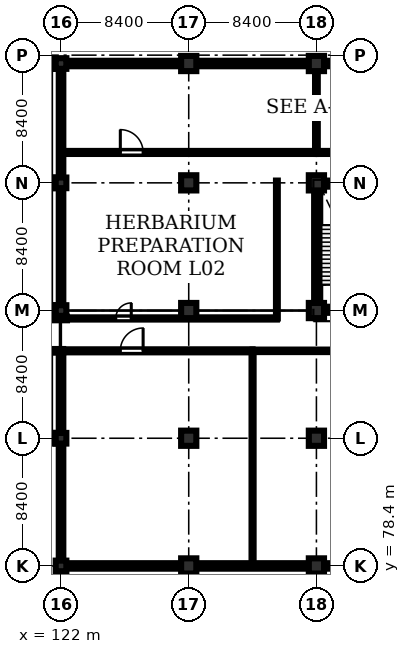
"""IFC4 building model, lengths in metres.
Left out: names, types, materials, properties, quantities, classifications, styles, units other than length and angle.
Written with IfcOpenShell. Run it as: python <this file> out.ifc"""

import sys

from ifc_helpers import new_model, si_unit, direction, frame, frame_2d, origin, origin_2d, place, context, subcontext, project, spatial, rectangle, extrude, element, fill, save


model = new_model("IFC4")
c1 = context("Model", 3, precision=1e-05, world=origin(), true_north=direction((0.0, 1.0)))
c2 = subcontext(c1, "Body", "Model", "MODEL_VIEW")
j1 = project(units=[si_unit("LENGTHUNIT", "METRE"), si_unit("PLANEANGLEUNIT", "RADIAN")], contexts=[c1])
p1 = place(None, origin())
s1 = spatial("IfcSite", under=j1, at=p1, CompositionType="ELEMENT")
p2 = place(p1, origin())
s2 = spatial("IfcBuilding", under=s1, at=p2, CompositionType="ELEMENT")
p3 = place(p2, frame((0.0, 0.0, 5.4)))
s3 = spatial("IfcBuildingStorey", under=s2, at=p3, CompositionType="ELEMENT", Elevation=5.4)
for number, where, z_axis, x_axis in (
    (1, (121.15, 86.8, 0.0), (0.0, 0.0, 1.0), (1.0, 0.0, 0.0)),
    (2, (121.15, 95.2, 0.0), (0.0, 0.0, 1.0), (1.0, 0.0, 0.0)),
    (3, (121.15, 103.6, 0.0), (0.0, 0.0, 1.0), (1.0, 0.0, 0.0)),
    (4, (121.15, 111.45, 0.0), (0.0, 0.0, 1.0), (1.0, 0.0, 0.0)),
    (5, (122.0, 78.4, 0.0), (0.0, 0.0, 1.0), (1.0, 0.0, 0.0)),
    (6, (122.0, 86.8, 0.0), (0.0, 0.0, 1.0), (1.0, 0.0, 0.0)),
    (7, (122.0, 95.2, 0.0), (0.0, 0.0, 1.0), (1.0, 0.0, 0.0)),
    (8, (122.0, 103.6, 0.0), (0.0, 0.0, 1.0), (1.0, 0.0, 0.0)),
    (9, (122.0, 111.45, 0.0), (0.0, 0.0, 1.0), (1.0, 0.0, 0.0)),
):
    element("IfcColumn", number, at=place(p3, frame(where, z_axis=z_axis, x_axis=x_axis)), inside=s3, PredefinedType="COLUMN", context=c2, shape_type="SweptSolid", body=[
        extrude(rectangle(XDim=0.7, YDim=0.7, at=origin_2d()), origin(), (0.0, 0.0, 1.0), 4.58),
    ])
for number, where, z_axis, x_axis in (
    (10, (130.4, 78.4, 0.0), (0.0, 0.0, 1.0), (1.0, 0.0, 0.0)),
    (11, (130.4, 86.8, 0.0), (0.0, 0.0, 1.0), (1.0, 0.0, 0.0)),
    (12, (130.4, 95.2, 0.0), (0.0, 0.0, 1.0), (1.0, 0.0, 0.0)),
    (13, (130.4, 103.6, 0.0), (0.0, 0.0, 1.0), (1.0, 0.0, 0.0)),
    (14, (130.4, 111.45, 0.0), (0.0, 0.0, 1.0), (1.0, 0.0, 0.0)),
    (15, (138.8, 78.4, 0.0), (0.0, 0.0, 1.0), (1.0, 0.0, 0.0)),
    (16, (138.8, 86.8, 0.0), (0.0, 0.0, 1.0), (1.0, 0.0, 0.0)),
    (17, (138.8, 95.2, 0.0), (0.0, 0.0, 1.0), (1.0, 0.0, 0.0)),
    (18, (138.8, 103.6, 0.0), (0.0, 0.0, 1.0), (1.0, 0.0, 0.0)),
    (19, (138.8, 111.45, 0.0), (0.0, 0.0, 1.0), (1.0, 0.0, 0.0)),
):
    element("IfcColumn", number, at=place(p3, frame(where, z_axis=z_axis, x_axis=x_axis)), inside=s3, PredefinedType="COLUMN", context=c2, shape_type="SweptSolid", body=[
        extrude(rectangle(XDim=1.0, YDim=1.0, at=origin_2d()), origin(), (0.0, 0.0, 1.0), 4.58),
    ])
for number, where, z_axis, x_axis in (
    (20, (138.65, 95.25, 0.0), (0.0, 0.0, 1.0), (1.0, 0.0, 0.0)),
    (21, (138.65, 103.55, 0.0), (0.0, 0.0, 1.0), (1.0, 0.0, 0.0)),
):
    element("IfcWall", number, at=place(p3, frame(where, z_axis=z_axis, x_axis=x_axis)), inside=s3, PredefinedType="SHEAR", context=c2, shape_type="SweptSolid", body=[
        extrude(rectangle(XDim=3.9, YDim=0.4, at=frame_2d((1.95, 0.0))), origin(), (0.0, 0.0, 1.0), 4.58),
    ])
p4 = place(p3, frame((138.85, 95.45, 0.0), z_axis=(0.0, 0.0, 1.0), x_axis=(0.0, 1.0, 0.0)))
e22 = element("IfcWall", 22, at=p4, inside=s3, PredefinedType="SHEAR", context=c2, shape_type="SweptSolid", body=[
    extrude(rectangle(XDim=7.9, YDim=0.4, at=frame_2d((3.95, 0.0))), origin(), (0.0, 0.0, 1.0), 4.58),
])
p5 = place(p3, frame((122.35, 111.45, 0.0), z_axis=(0.0, 0.0, 1.0), x_axis=(1.0, 0.0, 0.0)))
e23 = element("IfcWall", 23, at=p5, inside=s3, PredefinedType="STANDARD", context=c2, shape_type="SweptSolid", body=[
    extrude(rectangle(XDim=7.55, YDim=0.36, at=frame_2d((3.775, 0.0))), origin(), (0.0, 0.0, 1.0), 3.83),
])
p6 = place(p5, frame((1.3, 0.0, 1.1)))
e24 = element("IfcOpeningElement", 24, at=p6, cuts=e23, PredefinedType="OPENING", context=c2, shape_type="SweptSolid", body=[
    extrude(rectangle(XDim=1.2, YDim=1.5, at=frame_2d((0.6, 0.75))), frame((0.0, 0.19, 0.0), z_axis=(0.0, -1.0, 0.0), x_axis=(1.0, 0.0, 0.0)), (0.0, 0.0, 1.0), 0.38),
])
p7 = place(p5, frame((5.1, 0.0, 1.1)))
e25 = element("IfcOpeningElement", 25, at=p7, cuts=e23, PredefinedType="OPENING", context=c2, shape_type="SweptSolid", body=[
    extrude(rectangle(XDim=1.2, YDim=1.5, at=frame_2d((0.6, 0.75))), frame((0.0, 0.19, 0.0), z_axis=(0.0, -1.0, 0.0), x_axis=(1.0, 0.0, 0.0)), (0.0, 0.0, 1.0), 0.38),
])
p8 = place(p3, frame((130.9, 111.45, 0.0), z_axis=(0.0, 0.0, 1.0), x_axis=(1.0, 0.0, 0.0)))
e26 = element("IfcWall", 26, at=p8, inside=s3, PredefinedType="STANDARD", context=c2, shape_type="SweptSolid", body=[
    extrude(rectangle(XDim=7.4, YDim=0.36, at=frame_2d((3.7, 0.0))), origin(), (0.0, 0.0, 1.0), 3.83),
])
p9 = place(p8, frame((1.3, 0.0, 1.1)))
e27 = element("IfcOpeningElement", 27, at=p9, cuts=e26, PredefinedType="OPENING", context=c2, shape_type="SweptSolid", body=[
    extrude(rectangle(XDim=1.2, YDim=1.5, at=frame_2d((0.6, 0.75))), frame((0.0, 0.19, 0.0), z_axis=(0.0, -1.0, 0.0), x_axis=(1.0, 0.0, 0.0)), (0.0, 0.0, 1.0), 0.38),
])
p10 = place(p8, frame((5.1, 0.0, 1.1)))
e28 = element("IfcOpeningElement", 28, at=p10, cuts=e26, PredefinedType="OPENING", context=c2, shape_type="SweptSolid", body=[
    extrude(rectangle(XDim=1.2, YDim=1.5, at=frame_2d((0.6, 0.75))), frame((0.0, 0.19, 0.0), z_axis=(0.0, -1.0, 0.0), x_axis=(1.0, 0.0, 0.0)), (0.0, 0.0, 1.0), 0.38),
])
p11 = place(p3, frame((139.3, 111.45, 0.0), z_axis=(0.0, 0.0, 1.0), x_axis=(1.0, 0.0, 0.0)))
e29 = element("IfcWall", 29, at=p11, inside=s3, PredefinedType="STANDARD", context=c2, shape_type="SweptSolid", body=[
    extrude(rectangle(XDim=7.4, YDim=0.36, at=frame_2d((3.7, 0.0))), origin(), (0.0, 0.0, 1.0), 3.83),
])
p12 = place(p11, frame((1.3, 0.0, 1.1)))
e30 = element("IfcOpeningElement", 30, at=p12, cuts=e29, PredefinedType="OPENING", context=c2, shape_type="SweptSolid", body=[
    extrude(rectangle(XDim=1.2, YDim=1.5, at=frame_2d((0.6, 0.75))), frame((0.0, 0.19, 0.0), z_axis=(0.0, -1.0, 0.0), x_axis=(1.0, 0.0, 0.0)), (0.0, 0.0, 1.0), 0.38),
])
p13 = place(p11, frame((5.1, 0.0, 1.1)))
e31 = element("IfcOpeningElement", 31, at=p13, cuts=e29, PredefinedType="OPENING", context=c2, shape_type="SweptSolid", body=[
    extrude(rectangle(XDim=1.2, YDim=1.5, at=frame_2d((0.6, 0.75))), frame((0.0, 0.19, 0.0), z_axis=(0.0, -1.0, 0.0), x_axis=(1.0, 0.0, 0.0)), (0.0, 0.0, 1.0), 0.38),
])
p14 = place(p3, frame((129.9, 78.4, 0.0), z_axis=(0.0, 0.0, 1.0), x_axis=(-1.0, 0.0, 0.0)))
e32 = element("IfcWall", 32, at=p14, inside=s3, PredefinedType="STANDARD", context=c2, shape_type="SweptSolid", body=[
    extrude(rectangle(XDim=7.55, YDim=0.36, at=frame_2d((3.775, 0.0))), origin(), (0.0, 0.0, 1.0), 3.83),
])
p15 = place(p14, frame((1.15, 0.0, 0.95)))
e33 = element("IfcOpeningElement", 33, at=p15, cuts=e32, PredefinedType="OPENING", context=c2, shape_type="SweptSolid", body=[
    extrude(rectangle(XDim=1.5, YDim=1.5, at=frame_2d((0.75, 0.75))), frame((0.0, 0.19, 0.0), z_axis=(0.0, -1.0, 0.0), x_axis=(1.0, 0.0, 0.0)), (0.0, 0.0, 1.0), 0.38),
])
p16 = place(p3, frame((138.3, 78.4, 0.0), z_axis=(0.0, 0.0, 1.0), x_axis=(-1.0, 0.0, 0.0)))
e34 = element("IfcWall", 34, at=p16, inside=s3, PredefinedType="STANDARD", context=c2, shape_type="SweptSolid", body=[
    extrude(rectangle(XDim=7.4, YDim=0.36, at=frame_2d((3.7, 0.0))), origin(), (0.0, 0.0, 1.0), 3.83),
])
p17 = place(p16, frame((1.15, 0.0, 0.95)))
e35 = element("IfcOpeningElement", 35, at=p17, cuts=e34, PredefinedType="OPENING", context=c2, shape_type="SweptSolid", body=[
    extrude(rectangle(XDim=1.5, YDim=1.5, at=frame_2d((0.75, 0.75))), frame((0.0, 0.19, 0.0), z_axis=(0.0, -1.0, 0.0), x_axis=(1.0, 0.0, 0.0)), (0.0, 0.0, 1.0), 0.38),
])
p18 = place(p3, frame((146.7, 78.4, 0.0), z_axis=(0.0, 0.0, 1.0), x_axis=(-1.0, 0.0, 0.0)))
e36 = element("IfcWall", 36, at=p18, inside=s3, PredefinedType="STANDARD", context=c2, shape_type="SweptSolid", body=[
    extrude(rectangle(XDim=7.4, YDim=0.36, at=frame_2d((3.7, 0.0))), origin(), (0.0, 0.0, 1.0), 3.83),
])
p19 = place(p18, frame((1.15, 0.0, 0.95)))
e37 = element("IfcOpeningElement", 37, at=p19, cuts=e36, PredefinedType="OPENING", context=c2, shape_type="SweptSolid", body=[
    extrude(rectangle(XDim=1.5, YDim=1.5, at=frame_2d((0.75, 0.75))), frame((0.0, 0.19, 0.0), z_axis=(0.0, -1.0, 0.0), x_axis=(1.0, 0.0, 0.0)), (0.0, 0.0, 1.0), 0.38),
])
p20 = place(p3, frame((122.0, 78.75, 0.0), z_axis=(0.0, 0.0, 1.0), x_axis=(0.0, 1.0, 0.0)))
e38 = element("IfcWall", 38, at=p20, inside=s3, PredefinedType="STANDARD", context=c2, shape_type="SweptSolid", body=[
    extrude(rectangle(XDim=7.7, YDim=0.3, at=frame_2d((3.85, 0.0))), origin(), (0.0, 0.0, 1.0), 3.83),
])
p21 = place(p3, frame((122.0, 87.15, 0.0), z_axis=(0.0, 0.0, 1.0), x_axis=(0.0, 1.0, 0.0)))
e39 = element("IfcWall", 39, at=p21, inside=s3, PredefinedType="STANDARD", context=c2, shape_type="SweptSolid", body=[
    extrude(rectangle(XDim=5.27, YDim=0.3, at=frame_2d((2.635, 0.0))), origin(), (0.0, 0.0, 1.0), 3.83),
])
p22 = place(p3, frame((122.14, 92.55, 0.0), z_axis=(0.0, 0.0, 1.0), x_axis=(-1.0, 0.0, 0.0)))
e40 = element("IfcWall", 40, at=p22, inside=s3, PredefinedType="STANDARD", context=c2, shape_type="SweptSolid", body=[
    extrude(rectangle(XDim=1.11, YDim=0.24, at=frame_2d((0.555, 0.0))), origin(), (0.0, 0.0, 1.0), 4.58),
])
p23 = place(p3, frame((121.03, 94.68, 0.0), z_axis=(0.0, 0.0, 1.0), x_axis=(1.0, 0.0, 0.0)))
e41 = element("IfcWall", 41, at=p23, inside=s3, PredefinedType="STANDARD", context=c2, shape_type="SweptSolid", body=[
    extrude(rectangle(XDim=1.36, YDim=0.24, at=frame_2d((0.68, 0.0))), origin(), (0.0, 0.0, 1.0), 4.58),
])
p24 = place(p3, frame((122.0, 95.55, 0.0), z_axis=(0.0, 0.0, 1.0), x_axis=(0.0, 1.0, 0.0)))
e42 = element("IfcWall", 42, at=p24, inside=s3, PredefinedType="STANDARD", context=c2, shape_type="SweptSolid", body=[
    extrude(rectangle(XDim=7.7, YDim=0.3, at=frame_2d((3.85, 0.0))), origin(), (0.0, 0.0, 1.0), 3.83),
])
p25 = place(p3, frame((122.0, 103.95, 0.0), z_axis=(0.0, 0.0, 1.0), x_axis=(0.0, 1.0, 0.0)))
e43 = element("IfcWall", 43, at=p25, inside=s3, PredefinedType="STANDARD", context=c2, shape_type="SweptSolid", body=[
    extrude(rectangle(XDim=7.15, YDim=0.3, at=frame_2d((3.575, 0.0))), origin(), (0.0, 0.0, 1.0), 3.83),
])
p26 = place(p3, frame((136.2, 94.68, 0.0), z_axis=(0.0, 0.0, 1.0), x_axis=(0.0, 1.0, 0.0)))
e44 = element("IfcWall", 44, at=p26, inside=s3, PredefinedType="PARTITIONING", context=c2, shape_type="SweptSolid", body=[
    extrude(rectangle(XDim=9.07, YDim=0.12, at=frame_2d((4.535, 0.0))), origin(), (0.0, 0.0, 1.0), 4.58),
])
p27 = place(p3, frame((122.4, 94.68, 0.0), z_axis=(0.0, 0.0, 1.0), x_axis=(1.0, 0.0, 0.0)))
e45 = element("IfcWall", 45, at=p27, inside=s3, PredefinedType="PARTITIONING", context=c2, shape_type="SweptSolid", body=[
    extrude(rectangle(XDim=13.8, YDim=0.145, at=frame_2d((6.9, 0.0))), origin(), (0.0, 0.0, 1.0), 4.58),
])
p28 = place(p27, frame((3.2, 0.0, 0.0)))
e46 = element("IfcOpeningElement", 46, at=p28, cuts=e45, PredefinedType="OPENING", context=c2, shape_type="SweptSolid", body=[
    extrude(rectangle(XDim=1.02, YDim=2.15, at=frame_2d((0.51, 1.075))), frame((0.0, 0.083, 0.0), z_axis=(0.0, -1.0, 0.0), x_axis=(1.0, 0.0, 0.0)), (0.0, 0.0, 1.0), 0.165),
])
p29 = place(p3, frame((122.15, 105.6, 0.0), z_axis=(0.0, 0.0, 1.0), x_axis=(1.0, 0.0, 0.0)))
e47 = element("IfcWall", 47, at=p29, inside=s3, PredefinedType="SOLIDWALL", context=c2, shape_type="SweptSolid", body=[
    extrude(rectangle(XDim=16.65, YDim=0.2, at=frame_2d((8.325, 0.0))), origin(), (0.0, 0.0, 1.0), 4.58),
])
p30 = place(p29, frame((3.75, 0.0, 0.0)))
e48 = element("IfcOpeningElement", 48, at=p30, cuts=e47, PredefinedType="OPENING", context=c2, shape_type="SweptSolid", body=[
    extrude(rectangle(XDim=1.5, YDim=2.2, at=frame_2d((0.75, 1.1))), frame((0.0, 0.11, 0.0), z_axis=(0.0, -1.0, 0.0), x_axis=(1.0, 0.0, 0.0)), (0.0, 0.0, 1.0), 0.22),
])
p31 = place(p3, frame((138.8, 105.6, 0.0), z_axis=(0.0, 0.0, 1.0), x_axis=(1.0, 0.0, 0.0)))
e49 = element("IfcWall", 49, at=p31, inside=s3, PredefinedType="SOLIDWALL", context=c2, shape_type="SweptSolid", body=[
    extrude(rectangle(XDim=12.6, YDim=0.2, at=frame_2d((6.3, 0.0))), origin(), (0.0, 0.0, 1.0), 4.58),
])
p32 = place(p31, frame((3.4, 0.0, 0.0)))
e50 = element("IfcOpeningElement", 50, at=p32, cuts=e49, PredefinedType="OPENING", context=c2, shape_type="SweptSolid", body=[
    extrude(rectangle(XDim=1.25, YDim=2.2, at=frame_2d((0.625, 1.1))), frame((0.0, 0.11, 0.0), z_axis=(0.0, -1.0, 0.0), x_axis=(1.0, 0.0, 0.0)), (0.0, 0.0, 1.0), 0.22),
])
p33 = place(p3, frame((138.8, 105.6, 0.0), z_axis=(0.0, 0.0, 1.0), x_axis=(0.0, 1.0, 0.0)))
e51 = element("IfcWall", 51, at=p33, inside=s3, PredefinedType="STANDARD", context=c2, shape_type="SweptSolid", body=[
    extrude(rectangle(XDim=5.75, YDim=0.18, at=frame_2d((2.875, 0.0))), origin(), (0.0, 0.0, 1.0), 3.83),
])
p34 = place(p3, frame((122.15, 92.55, 0.0), z_axis=(0.0, 0.0, 1.0), x_axis=(1.0, 0.0, 0.0)))
e52 = element("IfcWall", 52, at=p34, inside=s3, PredefinedType="SOLIDWALL", context=c2, shape_type="SweptSolid", body=[
    extrude(rectangle(XDim=12.45, YDim=0.2, at=frame_2d((6.225, 0.0))), origin(), (0.0, 0.0, 1.0), 4.58),
])
p35 = place(p34, frame((3.75, 0.0, 0.0)))
e53 = element("IfcOpeningElement", 53, at=p35, cuts=e52, PredefinedType="OPENING", context=c2, shape_type="SweptSolid", body=[
    extrude(rectangle(XDim=1.5, YDim=2.2, at=frame_2d((0.75, 1.1))), frame((0.0, 0.11, 0.0), z_axis=(0.0, -1.0, 0.0), x_axis=(1.0, 0.0, 0.0)), (0.0, 0.0, 1.0), 0.22),
])
p36 = place(p3, frame((134.6, 92.55, 0.0), z_axis=(0.0, 0.0, 1.0), x_axis=(1.0, 0.0, 0.0)))
e54 = element("IfcWall", 54, at=p36, inside=s3, PredefinedType="PARTITIONING", context=c2, shape_type="SweptSolid", body=[
    extrude(rectangle(XDim=12.6, YDim=0.165, at=frame_2d((6.3, 0.0))), origin(), (0.0, 0.0, 1.0), 4.58),
])
p37 = place(p36, frame((6.8, 0.0, 0.0)))
e55 = element("IfcOpeningElement", 55, at=p37, cuts=e54, PredefinedType="OPENING", context=c2, shape_type="SweptSolid", body=[
    extrude(rectangle(XDim=1.7, YDim=2.2, at=frame_2d((0.85, 1.1))), frame((0.0, 0.093, 0.0), z_axis=(0.0, -1.0, 0.0), x_axis=(1.0, 0.0, 0.0)), (0.0, 0.0, 1.0), 0.185),
])
p38 = place(p3, frame((134.6, 78.55, 0.0), z_axis=(0.0, 0.0, 1.0), x_axis=(0.0, 1.0, 0.0)))
e56 = element("IfcWall", 56, at=p38, inside=s3, PredefinedType="PARTITIONING", context=c2, shape_type="SweptSolid", body=[
    extrude(rectangle(XDim=14.0, YDim=0.135, at=frame_2d((7.0, 0.0))), origin(), (0.0, 0.0, 1.0), 4.03),
])
p39 = place(p6, origin())
e57 = element("IfcWindow", 57, at=p39, inside=s3, PartitioningType="SINGLE_PANEL", PredefinedType="WINDOW", context=c2, shape_type="SweptSolid", body=[
    extrude(rectangle(XDim=1.2, YDim=1.5, at=frame_2d((0.6, 0.75))), frame((0.0, 0.03, 0.0), z_axis=(0.0, -1.0, 0.0), x_axis=(1.0, 0.0, 0.0)), (0.0, 0.0, 1.0), 0.06),
])
fill(e24, e57)
p40 = place(p7, origin())
e58 = element("IfcWindow", 58, at=p40, inside=s3, PartitioningType="SINGLE_PANEL", PredefinedType="WINDOW", context=c2, shape_type="SweptSolid", body=[
    extrude(rectangle(XDim=1.2, YDim=1.5, at=frame_2d((0.6, 0.75))), frame((0.0, 0.03, 0.0), z_axis=(0.0, -1.0, 0.0), x_axis=(1.0, 0.0, 0.0)), (0.0, 0.0, 1.0), 0.06),
])
fill(e25, e58)
p41 = place(p9, origin())
e59 = element("IfcWindow", 59, at=p41, inside=s3, PartitioningType="SINGLE_PANEL", PredefinedType="WINDOW", context=c2, shape_type="SweptSolid", body=[
    extrude(rectangle(XDim=1.2, YDim=1.5, at=frame_2d((0.6, 0.75))), frame((0.0, 0.03, 0.0), z_axis=(0.0, -1.0, 0.0), x_axis=(1.0, 0.0, 0.0)), (0.0, 0.0, 1.0), 0.06),
])
fill(e27, e59)
p42 = place(p10, origin())
e60 = element("IfcWindow", 60, at=p42, inside=s3, PartitioningType="SINGLE_PANEL", PredefinedType="WINDOW", context=c2, shape_type="SweptSolid", body=[
    extrude(rectangle(XDim=1.2, YDim=1.5, at=frame_2d((0.6, 0.75))), frame((0.0, 0.03, 0.0), z_axis=(0.0, -1.0, 0.0), x_axis=(1.0, 0.0, 0.0)), (0.0, 0.0, 1.0), 0.06),
])
fill(e28, e60)
p43 = place(p15, origin())
e61 = element("IfcWindow", 61, at=p43, inside=s3, PartitioningType="DOUBLE_PANEL_VERTICAL", PredefinedType="WINDOW", context=c2, shape_type="SweptSolid", body=[
    extrude(rectangle(XDim=1.5, YDim=1.5, at=frame_2d((0.75, 0.75))), frame((0.0, 0.03, 0.0), z_axis=(0.0, -1.0, 0.0), x_axis=(1.0, 0.0, 0.0)), (0.0, 0.0, 1.0), 0.06),
])
fill(e33, e61)
p44 = place(p17, origin())
e62 = element("IfcWindow", 62, at=p44, inside=s3, PartitioningType="DOUBLE_PANEL_VERTICAL", PredefinedType="WINDOW", context=c2, shape_type="SweptSolid", body=[
    extrude(rectangle(XDim=1.5, YDim=1.5, at=frame_2d((0.75, 0.75))), frame((0.0, 0.03, 0.0), z_axis=(0.0, -1.0, 0.0), x_axis=(1.0, 0.0, 0.0)), (0.0, 0.0, 1.0), 0.06),
])
fill(e35, e62)
p45 = place(p28, origin())
e63 = element("IfcDoor", 63, at=p45, inside=s3, OperationType="SINGLE_SWING_RIGHT", PredefinedType="DOOR", context=c2, shape_type="SweptSolid", body=[
    extrude(rectangle(XDim=1.02, YDim=2.15, at=frame_2d((0.51, 1.075))), frame((0.0, 0.025, 0.0), z_axis=(0.0, -1.0, 0.0), x_axis=(1.0, 0.0, 0.0)), (0.0, 0.0, 1.0), 0.05),
])
fill(e46, e63)
p46 = place(p30, origin())
e64 = element("IfcDoor", 64, at=p46, inside=s3, OperationType="SINGLE_SWING_LEFT", PredefinedType="DOOR", context=c2, shape_type="SweptSolid", body=[
    extrude(rectangle(XDim=1.5, YDim=2.2, at=frame_2d((0.75, 1.1))), frame((0.0, 0.025, 0.0), z_axis=(0.0, -1.0, 0.0), x_axis=(1.0, 0.0, 0.0)), (0.0, 0.0, 1.0), 0.05),
])
fill(e48, e64)
p47 = place(p35, origin())
e65 = element("IfcDoor", 65, at=p47, inside=s3, OperationType="SINGLE_SWING_RIGHT", PredefinedType="DOOR", context=c2, shape_type="SweptSolid", body=[
    extrude(rectangle(XDim=1.5, YDim=2.2, at=frame_2d((0.75, 1.1))), frame((0.0, 0.025, 0.0), z_axis=(0.0, -1.0, 0.0), x_axis=(1.0, 0.0, 0.0)), (0.0, 0.0, 1.0), 0.05),
])
fill(e53, e65)
save(model, sys.argv[1])
